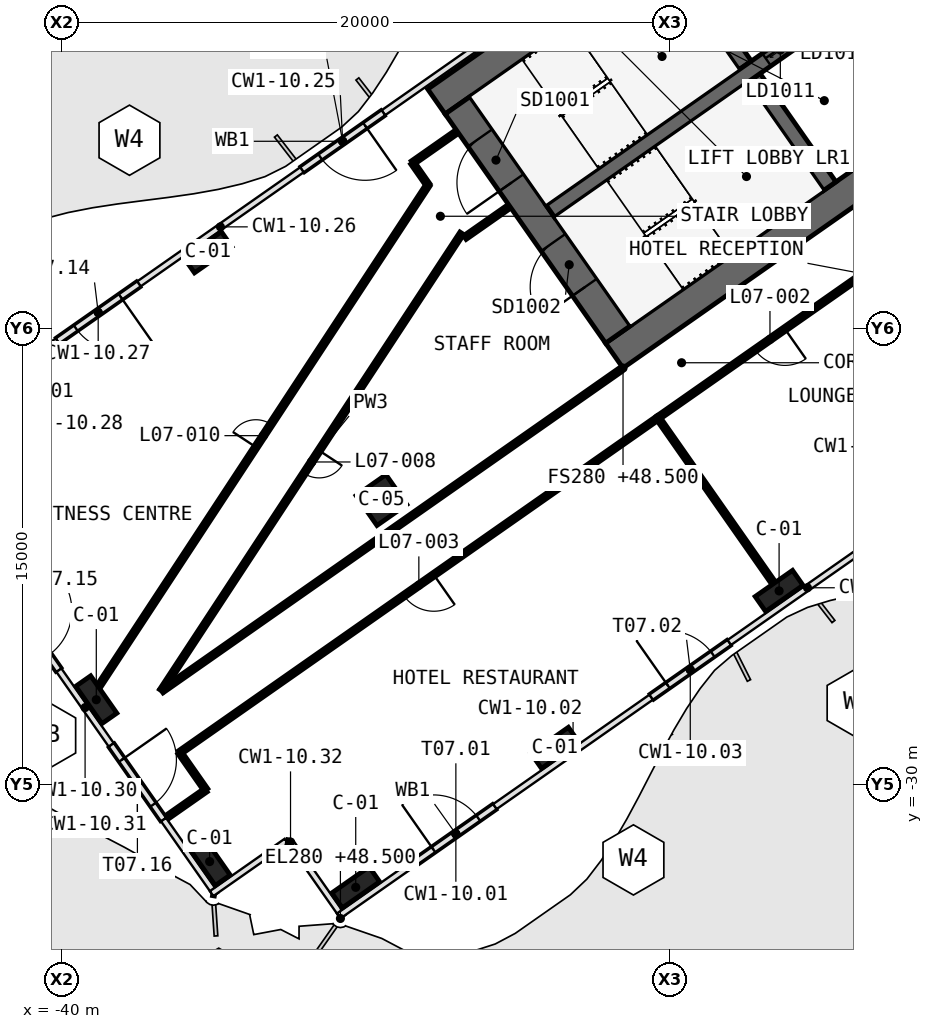
"""IFC4 building model, lengths in metres.
Left out: names, types, materials, properties, quantities, classifications, styles, units other than length and angle.
Written with IfcOpenShell. Run it as: python <this file> out.ifc"""

import sys

from ifc_helpers import new_model, si_unit, direction, frame, frame_2d, origin, origin_2d, place, context, subcontext, project, spatial, polyline, rectangle, outline, extrude, element, fill, save


model = new_model("IFC4")
c1 = context("Model", 3, precision=1e-05, world=origin(), true_north=direction((0.0, 1.0)))
c2 = subcontext(c1, "Body", "Model", "MODEL_VIEW")
j1 = project(units=[si_unit("LENGTHUNIT", "METRE"), si_unit("PLANEANGLEUNIT", "RADIAN")], contexts=[c1])
p1 = place(None, origin())
s1 = spatial("IfcSite", under=j1, at=p1, CompositionType="ELEMENT")
p2 = place(p1, origin())
s2 = spatial("IfcBuilding", under=s1, at=p2, CompositionType="ELEMENT")
p3 = place(p2, frame((0.0, 0.0, 48.5)))
s3 = spatial("IfcBuildingStorey", under=s2, at=p3, CompositionType="ELEMENT", Elevation=48.5)
p4 = place(p3, frame((0.037, 11.867, 0.0), z_axis=(0.0, 0.0, 1.0), x_axis=(-0.819155306259, -0.573571777746, 0.0)))
e1 = element("IfcWall", 1, at=p4, inside=s3, PredefinedType="SHEAR", context=c2, shape_type="SweptSolid", body=[
    extrude(outline(polyline([(33.837, 0.5), (0.7, 0.5), (0.0, -0.5), (33.837, -0.5), (33.837, 0.5)])), origin(), (0.0, 0.0, 1.0), 6.0),
])
p5 = place(p3, frame((0.037, -0.585, 0.0), z_axis=(0.0, 0.0, 1.0), x_axis=(-0.819157152511, -0.573569140985, 0.0)))
e2 = element("IfcWall", 2, at=p5, inside=s3, PredefinedType="SHEAR", context=c2, shape_type="SweptSolid", body=[
    extrude(outline(polyline([(26.695, 0.5), (0.7, 0.5), (0.0, -0.5), (26.695, -0.5), (26.695, 0.5)])), origin(), (0.0, 0.0, 1.0), 6.0),
])
p6 = place(p5, frame((2.995, 0.0, 0.0)))
e3 = element("IfcOpeningElement", 3, at=p6, cuts=e2, PredefinedType="OPENING", context=c2, shape_type="SweptSolid", body=[
    extrude(rectangle(XDim=2.4, YDim=2.1, at=frame_2d((1.2, 1.05))), frame((0.0, 0.51, 0.0), z_axis=(0.0, -1.0, 0.0), x_axis=(1.0, 0.0, 0.0)), (0.0, 0.0, 1.0), 1.02),
])
p7 = place(p5, frame((11.995, 0.0, 0.0)))
e4 = element("IfcOpeningElement", 4, at=p7, cuts=e2, PredefinedType="OPENING", context=c2, shape_type="SweptSolid", body=[
    extrude(rectangle(XDim=2.4, YDim=2.1, at=frame_2d((1.2, 1.05))), frame((0.0, 0.51, 0.0), z_axis=(0.0, -1.0, 0.0), x_axis=(1.0, 0.0, 0.0)), (0.0, 0.0, 1.0), 1.02),
])
p8 = place(p3, frame((-21.708, -15.2, 0.0), z_axis=(0.0, 0.0, 1.0), x_axis=(-0.573576324356, 0.819152122709, 0.0)))
e5 = element("IfcWall", 5, at=p8, inside=s3, PredefinedType="SHEAR", context=c2, shape_type="SweptSolid", body=[
    extrude(outline(polyline([(0.0, 0.5), (0.0, -0.5), (9.2, -0.5), (9.2, 0.5), (0.0, 0.5)])), origin(), (0.0, 0.0, 1.0), 6.0),
])
p9 = place(p8, frame((6.1, 0.0, 0.0)))
e6 = element("IfcOpeningElement", 6, at=p9, cuts=e5, PredefinedType="OPENING", context=c2, shape_type="SweptSolid", body=[
    extrude(rectangle(XDim=1.8, YDim=2.1, at=frame_2d((0.9, 1.05))), frame((0.0, 0.51, 0.0), z_axis=(0.0, -1.0, 0.0), x_axis=(1.0, 0.0, 0.0)), (0.0, 0.0, 1.0), 1.02),
])
p10 = place(p8, frame((1.9, 0.0, 0.0)))
e7 = element("IfcOpeningElement", 7, at=p10, cuts=e5, PredefinedType="OPENING", context=c2, shape_type="SweptSolid", body=[
    extrude(rectangle(XDim=1.8, YDim=2.1, at=frame_2d((0.9, 1.05))), frame((0.0, 0.51, 0.0), z_axis=(0.0, -1.0, 0.0), x_axis=(1.0, 0.0, 0.0)), (0.0, 0.0, 1.0), 1.02),
])
p11 = place(p3, frame((-14.745, -10.324, 0.0), z_axis=(0.0, 0.0, 1.0), x_axis=(-0.57356780395, 0.819158088694, 0.0)))
e8 = element("IfcWall", 8, at=p11, inside=s3, PredefinedType="SHEAR", context=c2, shape_type="SweptSolid", body=[
    extrude(outline(polyline([(4.35, 0.25), (0.0, 0.25), (0.0, -0.25), (4.35, -0.25), (4.35, 0.25)])), origin(), (0.0, 0.0, 1.0), 6.0),
])
p12 = place(p3, frame((-17.527, -6.352, 0.0), z_axis=(0.0, 0.0, 1.0), x_axis=(-0.573530143085, 0.819184457233, 0.0)))
e9 = element("IfcWall", 9, at=p12, inside=s3, PredefinedType="SHEAR", context=c2, shape_type="SweptSolid", body=[
    extrude(outline(polyline([(4.35, -0.25), (4.35, 0.25), (0.0, 0.25), (0.0, -0.25), (4.35, -0.25)])), origin(), (0.0, 0.0, 1.0), 6.0),
])
p13 = place(p3, frame((-2.638, 3.768, 0.0), z_axis=(0.0, 0.0, 1.0), x_axis=(-0.819148977158, -0.573580816643, 0.0)))
e10 = element("IfcWall", 10, at=p13, inside=s3, PredefinedType="SHEAR", context=c2, shape_type="SweptSolid", body=[
    extrude(outline(polyline([(26.0, 0.25), (0.0, 0.25), (0.0, -0.25), (26.0, -0.25), (26.0, 0.25)])), origin(), (0.0, 0.0, 1.0), 6.0),
])
p14 = place(p13, frame((1.169, 0.0, 0.0)))
e11 = element("IfcOpeningElement", 11, at=p14, cuts=e10, PredefinedType="OPENING", context=c2, shape_type="SweptSolid", body=[
    extrude(rectangle(XDim=1.1, YDim=2.1, at=frame_2d((0.55, 1.05))), frame((0.0, 0.26, 0.0), z_axis=(0.0, -1.0, 0.0), x_axis=(1.0, 0.0, 0.0)), (0.0, 0.0, 1.0), 0.52),
])
p15 = place(p13, frame((3.206, 0.0, 0.0)))
e12 = element("IfcOpeningElement", 12, at=p15, cuts=e10, PredefinedType="OPENING", context=c2, shape_type="SweptSolid", body=[
    extrude(rectangle(XDim=1.1, YDim=2.1, at=frame_2d((0.55, 1.05))), frame((0.0, 0.26, 0.0), z_axis=(0.0, -1.0, 0.0), x_axis=(1.0, 0.0, 0.0)), (0.0, 0.0, 1.0), 0.52),
])
p16 = place(p13, frame((5.244, 0.0, 0.0)))
e13 = element("IfcOpeningElement", 13, at=p16, cuts=e10, PredefinedType="OPENING", context=c2, shape_type="SweptSolid", body=[
    extrude(rectangle(XDim=1.1, YDim=2.1, at=frame_2d((0.55, 1.05))), frame((0.0, 0.26, 0.0), z_axis=(0.0, -1.0, 0.0), x_axis=(1.0, 0.0, 0.0)), (0.0, 0.0, 1.0), 0.52),
])
p17 = place(p13, frame((7.281, 0.0, 0.0)))
e14 = element("IfcOpeningElement", 14, at=p17, cuts=e10, PredefinedType="OPENING", context=c2, shape_type="SweptSolid", body=[
    extrude(rectangle(XDim=1.1, YDim=2.1, at=frame_2d((0.55, 1.05))), frame((0.0, 0.26, 0.0), z_axis=(0.0, -1.0, 0.0), x_axis=(1.0, 0.0, 0.0)), (0.0, 0.0, 1.0), 0.52),
])
p18 = place(p13, frame((9.688, 0.0, 0.0)))
e15 = element("IfcOpeningElement", 15, at=p18, cuts=e10, PredefinedType="OPENING", context=c2, shape_type="SweptSolid", body=[
    extrude(rectangle(XDim=1.1, YDim=2.1, at=frame_2d((0.55, 1.05))), frame((0.0, 0.26, 0.0), z_axis=(0.0, -1.0, 0.0), x_axis=(1.0, 0.0, 0.0)), (0.0, 0.0, 1.0), 0.52),
])
p19 = place(p13, frame((11.863, 0.0, 0.0)))
e16 = element("IfcOpeningElement", 16, at=p19, cuts=e10, PredefinedType="OPENING", context=c2, shape_type="SweptSolid", body=[
    extrude(rectangle(XDim=1.1, YDim=2.1, at=frame_2d((0.55, 1.05))), frame((0.0, 0.26, 0.0), z_axis=(0.0, -1.0, 0.0), x_axis=(1.0, 0.0, 0.0)), (0.0, 0.0, 1.0), 0.52),
])
p20 = place(p13, frame((14.038, 0.0, 0.0)))
e17 = element("IfcOpeningElement", 17, at=p20, cuts=e10, PredefinedType="OPENING", context=c2, shape_type="SweptSolid", body=[
    extrude(rectangle(XDim=1.1, YDim=2.1, at=frame_2d((0.55, 1.05))), frame((0.0, 0.26, 0.0), z_axis=(0.0, -1.0, 0.0), x_axis=(1.0, 0.0, 0.0)), (0.0, 0.0, 1.0), 0.52),
])
p21 = place(p13, frame((16.212, 0.0, 0.0)))
e18 = element("IfcOpeningElement", 18, at=p21, cuts=e10, PredefinedType="OPENING", context=c2, shape_type="SweptSolid", body=[
    extrude(rectangle(XDim=1.1, YDim=2.1, at=frame_2d((0.55, 1.05))), frame((0.0, 0.26, 0.0), z_axis=(0.0, -1.0, 0.0), x_axis=(1.0, 0.0, 0.0)), (0.0, 0.0, 1.0), 0.52),
])
for number, where, z_axis, x_axis in (
    (19, (-16.41, -23.637, 0.0), (0.0, 0.0, 1.0), (-0.819, -0.574, 0.0)),
    (20, (-23.782, -28.799, 0.0), (0.0, 0.0, 1.0), (-0.819, -0.574, 0.0)),
    (21, (-30.336, -33.388, 0.0), (0.0, 0.0, 1.0), (-0.819, -0.574, 0.0)),
    (22, (-35.197, -12.498, 0.0), (0.0, 0.0, 1.0), (-0.819, -0.574, 0.0)),
    (23, (-35.14, -32.541, 0.0), (0.0, 0.0, 1.0), (-0.574, 0.819, 0.0)),
    (24, (-38.869, -27.216, 0.0), (0.0, 0.0, 1.0), (-0.574, 0.819, 0.0)),
):
    element("IfcColumn", number, at=place(p3, frame(where, z_axis=z_axis, x_axis=x_axis)), inside=s3, PredefinedType="COLUMN", context=c2, shape_type="SweptSolid", body=[
        extrude(rectangle(XDim=1.5, YDim=0.6, at=origin_2d()), origin(), (0.0, 0.0, 1.0), 6.0),
    ])
p22 = place(p3, frame((-29.49, -20.649, 0.0), z_axis=(0.0, 0.0, 1.0), x_axis=(-0.819152044289, -0.573576436351, 0.0)))
e25 = element("IfcColumn", 25, at=p22, inside=s3, PredefinedType="COLUMN", context=c2, shape_type="SweptSolid", body=[
    extrude(rectangle(XDim=1.2, YDim=1.2, at=origin_2d()), origin(), (0.0, 0.0, 1.0), 6.0),
])
p23 = place(p3, frame((-28.302, -32.513, 0.0), z_axis=(0.0, 0.0, 1.0), x_axis=(0.819164830218, 0.573558175719, 0.0)))
e26 = element("IfcWall", 26, at=p23, inside=s3, PredefinedType="SOLIDWALL", context=c2, shape_type="SweptSolid", body=[
    extrude(rectangle(XDim=3.078, YDim=0.2, at=frame_2d((1.539, 0.0))), origin(), (0.0, 0.0, 1.0), 5.72),
])
p24 = place(p23, frame((0.639, 0.0, 0.0)))
e27 = element("IfcOpeningElement", 27, at=p24, cuts=e26, PredefinedType="OPENING", context=c2, shape_type="SweptSolid", body=[
    extrude(rectangle(XDim=1.8, YDim=2.4, at=frame_2d((0.9, 1.2))), frame((0.0, 0.11, 0.0), z_axis=(0.0, -1.0, 0.0), x_axis=(1.0, 0.0, 0.0)), (0.0, 0.0, 1.0), 0.22),
])
p25 = place(p3, frame((-20.592, -27.115, 0.0), z_axis=(0.0, 0.0, 1.0), x_axis=(0.819138730461, 0.573595449998, 0.0)))
e28 = element("IfcWall", 28, at=p25, inside=s3, PredefinedType="SOLIDWALL", context=c2, shape_type="SweptSolid", body=[
    extrude(rectangle(XDim=3.077, YDim=0.2, at=frame_2d((1.539, 0.0))), origin(), (0.0, 0.0, 1.0), 5.72),
])
p26 = place(p25, frame((0.639, 0.0, 0.0)))
e29 = element("IfcOpeningElement", 29, at=p26, cuts=e28, PredefinedType="OPENING", context=c2, shape_type="SweptSolid", body=[
    extrude(rectangle(XDim=1.8, YDim=2.4, at=frame_2d((0.9, 1.2))), frame((0.0, 0.11, 0.0), z_axis=(0.0, -1.0, 0.0), x_axis=(1.0, 0.0, 0.0)), (0.0, 0.0, 1.0), 0.22),
])
p27 = place(p3, frame((-29.45, -7.925, 0.0), z_axis=(0.0, 0.0, 1.0), x_axis=(-0.819156924044, -0.573569467276, 0.0)))
e30 = element("IfcWall", 30, at=p27, inside=s3, PredefinedType="SOLIDWALL", context=c2, shape_type="SweptSolid", body=[
    extrude(rectangle(XDim=3.212, YDim=0.2, at=frame_2d((1.606, 0.0))), origin(), (0.0, 0.0, 1.0), 5.72),
])
p28 = place(p27, frame((0.706, 0.0, 0.0)))
e31 = element("IfcOpeningElement", 31, at=p28, cuts=e30, PredefinedType="OPENING", context=c2, shape_type="SweptSolid", body=[
    extrude(rectangle(XDim=1.8, YDim=2.4, at=frame_2d((0.9, 1.2))), frame((0.0, 0.11, 0.0), z_axis=(0.0, -1.0, 0.0), x_axis=(1.0, 0.0, 0.0)), (0.0, 0.0, 1.0), 0.22),
])
p29 = place(p3, frame((-37.491, -13.555, 0.0), z_axis=(0.0, 0.0, 1.0), x_axis=(-0.819156924044, -0.573569467276, 0.0)))
e32 = element("IfcWall", 32, at=p29, inside=s3, PredefinedType="SOLIDWALL", context=c2, shape_type="SweptSolid", body=[
    extrude(rectangle(XDim=3.212, YDim=0.2, at=frame_2d((1.606, 0.0))), origin(), (0.0, 0.0, 1.0), 5.72),
])
p30 = place(p29, frame((0.706, 0.0, 0.0)))
e33 = element("IfcOpeningElement", 33, at=p30, cuts=e32, PredefinedType="OPENING", context=c2, shape_type="SweptSolid", body=[
    extrude(rectangle(XDim=1.8, YDim=2.4, at=frame_2d((0.9, 1.2))), frame((0.0, 0.11, 0.0), z_axis=(0.0, -1.0, 0.0), x_axis=(1.0, 0.0, 0.0)), (0.0, 0.0, 1.0), 0.22),
])
p31 = place(p3, frame((-41.801, -23.813, 0.0), z_axis=(0.0, 0.0, 1.0), x_axis=(0.573584953252, -0.819146080625, 0.0)))
e34 = element("IfcWall", 34, at=p31, inside=s3, PredefinedType="SOLIDWALL", context=c2, shape_type="SweptSolid", body=[
    extrude(rectangle(XDim=2.94, YDim=0.2, at=frame_2d((1.47, 0.0))), origin(), (0.0, 0.0, 1.0), 5.72),
])
p32 = place(p31, frame((0.57, 0.0, 0.0)))
e35 = element("IfcOpeningElement", 35, at=p32, cuts=e34, PredefinedType="OPENING", context=c2, shape_type="SweptSolid", body=[
    extrude(rectangle(XDim=1.8, YDim=2.4, at=frame_2d((0.9, 1.2))), frame((0.0, 0.11, 0.0), z_axis=(0.0, -1.0, 0.0), x_axis=(1.0, 0.0, 0.0)), (0.0, 0.0, 1.0), 0.22),
])
p33 = place(p3, frame((-38.36, -28.728, 0.0), z_axis=(0.0, 0.0, 1.0), x_axis=(0.57354593704, -0.81917339929, 0.0)))
e36 = element("IfcWall", 36, at=p33, inside=s3, PredefinedType="SOLIDWALL", context=c2, shape_type="SweptSolid", body=[
    extrude(rectangle(XDim=2.94, YDim=0.2, at=frame_2d((1.47, 0.0))), origin(), (0.0, 0.0, 1.0), 5.72),
])
p34 = place(p33, frame((0.57, 0.0, 0.0)))
e37 = element("IfcOpeningElement", 37, at=p34, cuts=e36, PredefinedType="OPENING", context=c2, shape_type="SweptSolid", body=[
    extrude(rectangle(XDim=1.8, YDim=2.4, at=frame_2d((0.9, 1.2))), frame((0.0, 0.11, 0.0), z_axis=(0.0, -1.0, 0.0), x_axis=(1.0, 0.0, 0.0)), (0.0, 0.0, 1.0), 0.22),
])
p35 = place(p3, frame((-13.022, -12.781, 0.0), z_axis=(0.0, 0.0, 1.0), x_axis=(-0.819142740634, -0.573589723117, 0.0)))
e38 = element("IfcWall", 38, at=p35, inside=s3, PredefinedType="PARTITIONING", context=c2, shape_type="SweptSolid", body=[
    extrude(rectangle(XDim=9.004, YDim=0.15, at=frame_2d((4.502, 0.0))), origin(), (0.0, 0.0, 1.0), 5.0),
])
p36 = place(p35, frame((3.902, 0.0, 0.0)))
e39 = element("IfcOpeningElement", 39, at=p36, cuts=e38, PredefinedType="OPENING", context=c2, shape_type="SweptSolid", body=[
    extrude(rectangle(XDim=1.2, YDim=2.4, at=frame_2d((0.6, 1.2))), frame((0.0, 0.085, 0.0), z_axis=(0.0, -1.0, 0.0), x_axis=(1.0, 0.0, 0.0)), (0.0, 0.0, 1.0), 0.17),
])
p37 = place(p3, frame((-35.264, -30.185, 0.0), z_axis=(0.0, 0.0, 1.0), x_axis=(-0.819131543282, -0.57360571371, 0.0)))
e40 = element("IfcWall", 40, at=p37, inside=s3, PredefinedType="PARTITIONING", context=c2, shape_type="SweptSolid", body=[
    extrude(rectangle(XDim=1.6, YDim=0.15, at=frame_2d((0.8, 0.0))), origin(), (0.0, 0.0, 1.0), 4.9),
])
p38 = place(p3, frame((-20.395, -17.943, 0.0), z_axis=(0.0, 0.0, 1.0), x_axis=(-0.819147689755, -0.573582655221, 0.0)))
e41 = element("IfcWall", 41, at=p38, inside=s3, PredefinedType="PARTITIONING", context=c2, shape_type="SweptSolid", body=[
    extrude(rectangle(XDim=19.202, YDim=0.15, at=frame_2d((9.601, 0.0))), origin(), (0.0, 0.0, 1.0), 5.0),
])
p39 = place(p38, frame((9.001, 0.0, 0.0)))
e42 = element("IfcOpeningElement", 42, at=p39, cuts=e41, PredefinedType="OPENING", context=c2, shape_type="SweptSolid", body=[
    extrude(rectangle(XDim=1.2, YDim=2.4, at=frame_2d((0.6, 1.2))), frame((0.0, 0.085, 0.0), z_axis=(0.0, -1.0, 0.0), x_axis=(1.0, 0.0, 0.0)), (0.0, 0.0, 1.0), 0.17),
])
p40 = place(p3, frame((-36.124, -28.957, 0.0), z_axis=(0.0, 0.0, 1.0), x_axis=(0.573527897688, -0.819186029284, 0.0)))
e43 = element("IfcWall", 43, at=p40, inside=s3, PredefinedType="PARTITIONING", context=c2, shape_type="SweptSolid", body=[
    extrude(rectangle(XDim=1.5, YDim=0.15, at=frame_2d((0.75, 0.0))), origin(), (0.0, 0.0, 1.0), 5.72),
])
p41 = place(p3, frame((-36.717, -26.93, 0.0), z_axis=(0.0, 0.0, 1.0), x_axis=(0.819150266993, 0.573578974585, 0.0)))
e44 = element("IfcWall", 44, at=p41, inside=s3, PredefinedType="PARTITIONING", context=c2, shape_type="SweptSolid", body=[
    extrude(rectangle(XDim=18.403, YDim=0.15, at=frame_2d((9.202, 0.0))), origin(), (0.0, 0.0, 1.0), 5.0),
])
p42 = place(p3, frame((-28.467, -9.556, 0.0), z_axis=(0.0, 0.0, 1.0), x_axis=(0.819109000826, 0.573637903879, 0.0)))
e45 = element("IfcWall", 45, at=p42, inside=s3, PredefinedType="PARTITIONING", context=c2, shape_type="SweptSolid", body=[
    extrude(rectangle(XDim=1.68, YDim=0.15, at=frame_2d((0.84, 0.0))), origin(), (0.0, 0.0, 1.0), 5.72),
])
p43 = place(p3, frame((-38.787, -26.775, 0.0), z_axis=(0.0, 0.0, 1.0), x_axis=(0.548981310193, 0.835834625424, 0.0)))
e46 = element("IfcWall", 46, at=p43, inside=s3, PredefinedType="PARTITIONING", context=c2, shape_type="SweptSolid", body=[
    extrude(rectangle(XDim=19.729, YDim=0.15, at=frame_2d((9.864, 0.0))), origin(), (0.0, 0.0, 1.0), 5.0),
])
p44 = place(p43, frame((9.414, 0.0, 0.0)))
e47 = element("IfcOpeningElement", 47, at=p44, cuts=e46, PredefinedType="OPENING", context=c2, shape_type="SweptSolid", body=[
    extrude(rectangle(XDim=0.9, YDim=2.1, at=frame_2d((0.45, 1.05))), frame((0.0, 0.085, 0.0), z_axis=(0.0, -1.0, 0.0), x_axis=(1.0, 0.0, 0.0)), (0.0, 0.0, 1.0), 0.17),
])
p45 = place(p3, frame((-27.957, -10.285, 0.0), z_axis=(0.0, 0.0, 1.0), x_axis=(-0.573370236326, 0.819296388431, 0.0)))
e48 = element("IfcWall", 48, at=p45, inside=s3, PredefinedType="PARTITIONING", context=c2, shape_type="SweptSolid", body=[
    extrude(rectangle(XDim=0.889, YDim=0.15, at=frame_2d((0.445, 0.0))), origin(), (0.0, 0.0, 1.0), 5.72),
])
p46 = place(p3, frame((-25.37, -11.05, 0.0), z_axis=(0.0, 0.0, 1.0), x_axis=(-0.819109000826, -0.573637903879, 0.0)))
e49 = element("IfcWall", 49, at=p46, inside=s3, PredefinedType="PARTITIONING", context=c2, shape_type="SweptSolid", body=[
    extrude(rectangle(XDim=1.68, YDim=0.15, at=frame_2d((0.84, 0.0))), origin(), (0.0, 0.0, 1.0), 5.72),
])
p47 = place(p3, frame((-26.845, -11.872, 0.0), z_axis=(0.0, 0.0, 1.0), x_axis=(-0.54898817212, -0.835830118429, 0.0)))
e50 = element("IfcWall", 50, at=p47, inside=s3, PredefinedType="PARTITIONING", context=c2, shape_type="SweptSolid", body=[
    extrude(rectangle(XDim=18.002, YDim=0.15, at=frame_2d((9.001, 0.0))), origin(), (0.0, 0.0, 1.0), 5.0),
])
p48 = place(p47, frame((8.551, 0.0, 0.0)))
e51 = element("IfcOpeningElement", 51, at=p48, cuts=e50, PredefinedType="OPENING", context=c2, shape_type="SweptSolid", body=[
    extrude(rectangle(XDim=0.9, YDim=2.1, at=frame_2d((0.45, 1.05))), frame((0.0, 0.085, 0.0), z_axis=(0.0, -1.0, 0.0), x_axis=(1.0, 0.0, 0.0)), (0.0, 0.0, 1.0), 0.17),
])
p49 = place(p3, frame((-16.594, -23.375, 0.0), z_axis=(0.0, 0.0, 1.0), x_axis=(-0.57359826181, 0.819136761505, 0.0)))
e52 = element("IfcWall", 52, at=p49, inside=s3, PredefinedType="PARTITIONING", context=c2, shape_type="SweptSolid", body=[
    extrude(rectangle(XDim=6.63, YDim=0.15, at=frame_2d((3.315, 0.0))), origin(), (0.0, 0.0, 1.0), 5.0),
])
p50 = place(p21, origin())
e53 = element("IfcDoor", 53, at=p50, inside=s3, OperationType="SLIDING_TO_RIGHT", PredefinedType="DOOR", context=c2, shape_type="SweptSolid", body=[
    extrude(rectangle(XDim=1.1, YDim=2.1, at=frame_2d((0.55, 1.05))), frame((0.0, 0.025, 0.0), z_axis=(0.0, -1.0, 0.0), x_axis=(1.0, 0.0, 0.0)), (0.0, 0.0, 1.0), 0.05),
])
fill(e18, e53)
p51 = place(p9, origin())
e54 = element("IfcDoor", 54, at=p51, inside=s3, OperationType="DOUBLE_DOOR_SINGLE_SWING", PredefinedType="DOOR", context=c2, shape_type="SweptSolid", body=[
    extrude(rectangle(XDim=1.8, YDim=2.1, at=frame_2d((0.9, 1.05))), frame((0.0, 0.025, 0.0), z_axis=(0.0, -1.0, 0.0), x_axis=(1.0, 0.0, 0.0)), (0.0, 0.0, 1.0), 0.05),
])
fill(e6, e54)
p52 = place(p10, origin())
e55 = element("IfcDoor", 55, at=p52, inside=s3, OperationType="DOUBLE_DOOR_SINGLE_SWING", PredefinedType="DOOR", context=c2, shape_type="SweptSolid", body=[
    extrude(rectangle(XDim=1.8, YDim=2.1, at=frame_2d((0.9, 1.05))), frame((0.0, 0.025, 0.0), z_axis=(0.0, -1.0, 0.0), x_axis=(1.0, 0.0, 0.0)), (0.0, 0.0, 1.0), 0.05),
])
fill(e7, e55)
p53 = place(p24, origin())
e56 = element("IfcDoor", 56, at=p53, inside=s3, OperationType="DOUBLE_DOOR_DOUBLE_SWING", PredefinedType="DOOR", context=c2, shape_type="SweptSolid", body=[
    extrude(rectangle(XDim=1.8, YDim=2.4, at=frame_2d((0.9, 1.2))), frame((0.0, 0.025, 0.0), z_axis=(0.0, -1.0, 0.0), x_axis=(1.0, 0.0, 0.0)), (0.0, 0.0, 1.0), 0.05),
])
fill(e27, e56)
p54 = place(p26, origin())
e57 = element("IfcDoor", 57, at=p54, inside=s3, OperationType="DOUBLE_DOOR_DOUBLE_SWING", PredefinedType="DOOR", context=c2, shape_type="SweptSolid", body=[
    extrude(rectangle(XDim=1.8, YDim=2.4, at=frame_2d((0.9, 1.2))), frame((0.0, 0.025, 0.0), z_axis=(0.0, -1.0, 0.0), x_axis=(1.0, 0.0, 0.0)), (0.0, 0.0, 1.0), 0.05),
])
fill(e29, e57)
p55 = place(p28, origin())
e58 = element("IfcDoor", 58, at=p55, inside=s3, OperationType="DOUBLE_DOOR_DOUBLE_SWING", PredefinedType="DOOR", context=c2, shape_type="SweptSolid", body=[
    extrude(rectangle(XDim=1.8, YDim=2.4, at=frame_2d((0.9, 1.2))), frame((0.0, 0.025, 0.0), z_axis=(0.0, -1.0, 0.0), x_axis=(1.0, 0.0, 0.0)), (0.0, 0.0, 1.0), 0.05),
])
fill(e31, e58)
p56 = place(p30, origin())
e59 = element("IfcDoor", 59, at=p56, inside=s3, OperationType="DOUBLE_DOOR_DOUBLE_SWING", PredefinedType="DOOR", context=c2, shape_type="SweptSolid", body=[
    extrude(rectangle(XDim=1.8, YDim=2.4, at=frame_2d((0.9, 1.2))), frame((0.0, 0.025, 0.0), z_axis=(0.0, -1.0, 0.0), x_axis=(1.0, 0.0, 0.0)), (0.0, 0.0, 1.0), 0.05),
])
fill(e33, e59)
p57 = place(p34, origin())
e60 = element("IfcDoor", 60, at=p57, inside=s3, OperationType="DOUBLE_DOOR_DOUBLE_SWING", PredefinedType="DOOR", context=c2, shape_type="SweptSolid", body=[
    extrude(rectangle(XDim=1.8, YDim=2.4, at=frame_2d((0.9, 1.2))), frame((0.0, 0.025, 0.0), z_axis=(0.0, -1.0, 0.0), x_axis=(1.0, 0.0, 0.0)), (0.0, 0.0, 1.0), 0.05),
])
fill(e37, e60)
p58 = place(p36, origin())
e61 = element("IfcDoor", 61, at=p58, inside=s3, OperationType="DOUBLE_DOOR_SINGLE_SWING", PredefinedType="DOOR", context=c2, shape_type="SweptSolid", body=[
    extrude(rectangle(XDim=1.2, YDim=2.4, at=frame_2d((0.6, 1.2))), frame((0.0, 0.025, 0.0), z_axis=(0.0, -1.0, 0.0), x_axis=(1.0, 0.0, 0.0)), (0.0, 0.0, 1.0), 0.05),
])
fill(e39, e61)
p59 = place(p39, origin())
e62 = element("IfcDoor", 62, at=p59, inside=s3, OperationType="DOUBLE_DOOR_SINGLE_SWING", PredefinedType="DOOR", context=c2, shape_type="SweptSolid", body=[
    extrude(rectangle(XDim=1.2, YDim=2.4, at=frame_2d((0.6, 1.2))), frame((0.0, 0.025, 0.0), z_axis=(0.0, -1.0, 0.0), x_axis=(1.0, 0.0, 0.0)), (0.0, 0.0, 1.0), 0.05),
])
fill(e42, e62)
p60 = place(p48, origin())
e63 = element("IfcDoor", 63, at=p60, inside=s3, OperationType="SINGLE_SWING_RIGHT", PredefinedType="DOOR", context=c2, shape_type="SweptSolid", body=[
    extrude(rectangle(XDim=0.9, YDim=2.1, at=frame_2d((0.45, 1.05))), frame((0.0, 0.025, 0.0), z_axis=(0.0, -1.0, 0.0), x_axis=(1.0, 0.0, 0.0)), (0.0, 0.0, 1.0), 0.05),
])
fill(e51, e63)
p61 = place(p44, origin())
e64 = element("IfcDoor", 64, at=p61, inside=s3, OperationType="SINGLE_SWING_LEFT", PredefinedType="DOOR", context=c2, shape_type="SweptSolid", body=[
    extrude(rectangle(XDim=0.9, YDim=2.1, at=frame_2d((0.45, 1.05))), frame((0.0, 0.025, 0.0), z_axis=(0.0, -1.0, 0.0), x_axis=(1.0, 0.0, 0.0)), (0.0, 0.0, 1.0), 0.05),
])
fill(e47, e64)
save(model, sys.argv[1])
